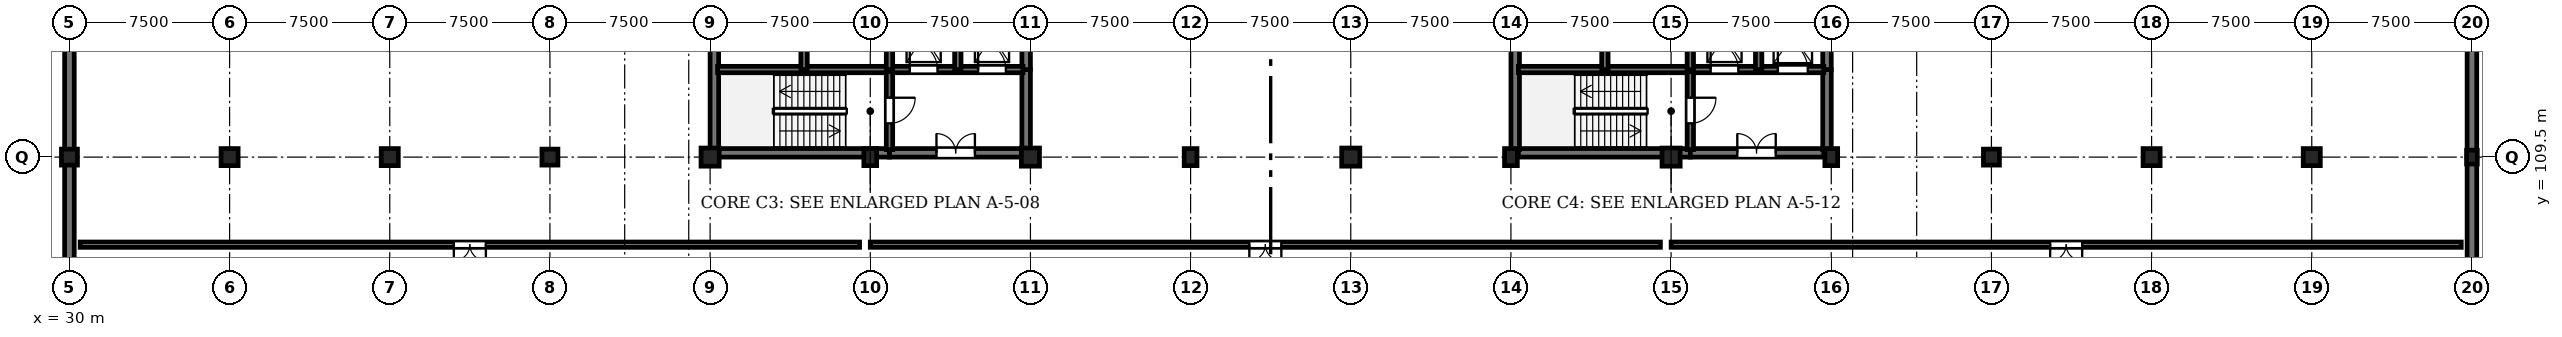
"""IFC4 building model, lengths in metres.
Left out: names, types, materials, properties, quantities, classifications, styles, units other than length and angle.
Written with IfcOpenShell. Run it as: python <this file> out.ifc"""

import sys

from ifc_helpers import new_model, si_unit, direction, frame, frame_2d, origin, origin_2d, place, context, subcontext, project, spatial, rectangle, circle, extrude, element, fill, save


model = new_model("IFC4")
c1 = context("Model", 3, precision=1e-05, world=origin(), true_north=direction((0.0, 1.0)))
c2 = subcontext(c1, "Body", "Model", "MODEL_VIEW")
j1 = project(units=[si_unit("LENGTHUNIT", "METRE"), si_unit("PLANEANGLEUNIT", "RADIAN")], contexts=[c1])
p1 = place(None, origin())
s1 = spatial("IfcSite", under=j1, at=p1, CompositionType="ELEMENT")
p2 = place(p1, origin())
s2 = spatial("IfcBuilding", under=s1, at=p2, CompositionType="ELEMENT")
p3 = place(p2, frame((0.0, 0.0, -4.5)))
s3 = spatial("IfcBuildingStorey", under=s2, at=p3, CompositionType="ELEMENT", Elevation=-4.5)
p4 = place(p3, frame((30.0, 109.5, 0.0), z_axis=(0.0, 0.0, 1.0), x_axis=(1.0, 0.0, 0.0)))
e1 = element("IfcColumn", 1, at=p4, inside=s3, PredefinedType="COLUMN", context=c2, shape_type="SweptSolid", body=[
    extrude(rectangle(XDim=0.75, YDim=0.75, at=origin_2d()), origin(), (0.0, 0.0, 1.0), 4.5),
])
for number, where, z_axis, x_axis in (
    (2, (37.5, 109.5, 0.0), (0.0, 0.0, 1.0), (1.0, 0.0, 0.0)),
    (3, (45.0, 109.5, 0.0), (0.0, 0.0, 1.0), (1.0, 0.0, 0.0)),
):
    element("IfcColumn", number, at=place(p3, frame(where, z_axis=z_axis, x_axis=x_axis)), inside=s3, PredefinedType="COLUMN", context=c2, shape_type="SweptSolid", body=[
        extrude(rectangle(XDim=0.8, YDim=0.8, at=origin_2d()), origin(), (0.0, 0.0, 1.0), 4.5),
    ])
p5 = place(p3, frame((52.5, 109.5, 0.0), z_axis=(0.0, 0.0, 1.0), x_axis=(1.0, 0.0, 0.0)))
e4 = element("IfcColumn", 4, at=p5, inside=s3, PredefinedType="COLUMN", context=c2, shape_type="SweptSolid", body=[
    extrude(circle(Radius=0.375, at=origin_2d()), origin(), (0.0, 0.0, 1.0), 4.5),
])
p6 = place(p3, frame((60.0, 109.5, 0.0), z_axis=(0.0, 0.0, 1.0), x_axis=(1.0, 0.0, 0.0)))
e5 = element("IfcColumn", 5, at=p6, inside=s3, PredefinedType="COLUMN", context=c2, shape_type="SweptSolid", body=[
    extrude(rectangle(XDim=0.85, YDim=0.85, at=origin_2d()), origin(), (0.0, 0.0, 1.0), 4.5),
])
p7 = place(p3, frame((67.5, 109.5, 0.0), z_axis=(0.0, 0.0, 1.0), x_axis=(1.0, 0.0, 0.0)))
e6 = element("IfcColumn", 6, at=p7, inside=s3, PredefinedType="COLUMN", context=c2, shape_type="SweptSolid", body=[
    extrude(rectangle(XDim=0.6, YDim=0.8, at=origin_2d()), origin(), (0.0, 0.0, 1.0), 4.5),
])
p8 = place(p3, frame((75.0, 109.5, 0.0), z_axis=(0.0, 0.0, 1.0), x_axis=(1.0, 0.0, 0.0)))
e7 = element("IfcColumn", 7, at=p8, inside=s3, PredefinedType="COLUMN", context=c2, shape_type="SweptSolid", body=[
    extrude(rectangle(XDim=0.85, YDim=0.85, at=origin_2d()), origin(), (0.0, 0.0, 1.0), 4.5),
])
p9 = place(p3, frame((82.5, 109.5, 0.0), z_axis=(0.0, 0.0, 1.0), x_axis=(1.0, 0.0, 0.0)))
e8 = element("IfcColumn", 8, at=p9, inside=s3, PredefinedType="COLUMN", context=c2, shape_type="SweptSolid", body=[
    extrude(rectangle(XDim=0.6, YDim=0.8, at=origin_2d()), origin(), (0.0, 0.0, 1.0), 4.5),
])
p10 = place(p3, frame((90.0, 109.5, 0.0), z_axis=(0.0, 0.0, 1.0), x_axis=(1.0, 0.0, 0.0)))
e9 = element("IfcColumn", 9, at=p10, inside=s3, PredefinedType="COLUMN", context=c2, shape_type="SweptSolid", body=[
    extrude(rectangle(XDim=0.85, YDim=0.85, at=origin_2d()), origin(), (0.0, 0.0, 1.0), 4.5),
])
p11 = place(p3, frame((97.5, 109.5, 0.0), z_axis=(0.0, 0.0, 1.0), x_axis=(1.0, 0.0, 0.0)))
e10 = element("IfcColumn", 10, at=p11, inside=s3, PredefinedType="COLUMN", context=c2, shape_type="SweptSolid", body=[
    extrude(rectangle(XDim=0.6, YDim=0.8, at=origin_2d()), origin(), (0.0, 0.0, 1.0), 4.5),
])
p12 = place(p3, frame((105.0, 109.5, 0.0), z_axis=(0.0, 0.0, 1.0), x_axis=(1.0, 0.0, 0.0)))
e11 = element("IfcColumn", 11, at=p12, inside=s3, PredefinedType="COLUMN", context=c2, shape_type="SweptSolid", body=[
    extrude(rectangle(XDim=0.85, YDim=0.85, at=origin_2d()), origin(), (0.0, 0.0, 1.0), 4.5),
])
p13 = place(p3, frame((112.5, 109.5, 0.0), z_axis=(0.0, 0.0, 1.0), x_axis=(1.0, 0.0, 0.0)))
e12 = element("IfcColumn", 12, at=p13, inside=s3, PredefinedType="COLUMN", context=c2, shape_type="SweptSolid", body=[
    extrude(rectangle(XDim=0.6, YDim=0.8, at=origin_2d()), origin(), (0.0, 0.0, 1.0), 4.5),
])
p14 = place(p3, frame((120.0, 109.5, 0.0), z_axis=(0.0, 0.0, 1.0), x_axis=(1.0, 0.0, 0.0)))
e13 = element("IfcColumn", 13, at=p14, inside=s3, PredefinedType="COLUMN", context=c2, shape_type="SweptSolid", body=[
    extrude(circle(Radius=0.375, at=origin_2d()), origin(), (0.0, 0.0, 1.0), 4.5),
])
for number, where, z_axis, x_axis in (
    (14, (127.5, 109.5, 0.0), (0.0, 0.0, 1.0), (1.0, 0.0, 0.0)),
    (15, (135.0, 109.5, 0.0), (0.0, 0.0, 1.0), (1.0, 0.0, 0.0)),
):
    element("IfcColumn", number, at=place(p3, frame(where, z_axis=z_axis, x_axis=x_axis)), inside=s3, PredefinedType="COLUMN", context=c2, shape_type="SweptSolid", body=[
        extrude(rectangle(XDim=0.8, YDim=0.8, at=origin_2d()), origin(), (0.0, 0.0, 1.0), 4.5),
    ])
p15 = place(p3, frame((142.5, 109.5, 0.0), z_axis=(0.0, 0.0, 1.0), x_axis=(1.0, 0.0, 0.0)))
e16 = element("IfcColumn", 16, at=p15, inside=s3, PredefinedType="COLUMN", context=c2, shape_type="SweptSolid", body=[
    extrude(rectangle(XDim=0.5, YDim=0.65, at=origin_2d()), origin(), (0.0, 0.0, 1.0), 4.5),
])
p16 = place(p3, frame((30.0, 100.5, 0.0), z_axis=(0.0, 0.0, 1.0), x_axis=(0.0, 1.0, 0.0)))
e17 = element("IfcWall", 17, at=p16, inside=s3, PredefinedType="SOLIDWALL", context=c2, shape_type="SweptSolid", body=[
    extrude(rectangle(XDim=9.0, YDim=0.45, at=frame_2d((4.5, 0.0))), origin(), (0.0, 0.0, 1.0), 4.14),
])
for number, where, z_axis, x_axis in (
    (18, (30.0, 109.5, 0.0), (0.0, 0.0, 1.0), (0.0, 1.0, 0.0)),
    (19, (142.5, 117.0, 0.0), (0.0, 0.0, 1.0), (0.0, -1.0, 0.0)),
):
    element("IfcWall", number, at=place(p3, frame(where, z_axis=z_axis, x_axis=x_axis)), inside=s3, PredefinedType="SOLIDWALL", context=c2, shape_type="SweptSolid", body=[
        extrude(rectangle(XDim=7.5, YDim=0.45, at=frame_2d((3.75, 0.0))), origin(), (0.0, 0.0, 1.0), 4.14),
    ])
p17 = place(p3, frame((142.5, 109.5, 0.0), z_axis=(0.0, 0.0, 1.0), x_axis=(0.0, -1.0, 0.0)))
e20 = element("IfcWall", 20, at=p17, inside=s3, PredefinedType="SOLIDWALL", context=c2, shape_type="SweptSolid", body=[
    extrude(rectangle(XDim=9.0, YDim=0.45, at=frame_2d((4.5, 0.0))), origin(), (0.0, 0.0, 1.0), 4.14),
])
p18 = place(p3, frame((60.35, 109.7, 0.0), z_axis=(0.0, 0.0, 1.0), x_axis=(1.0, 0.0, 0.0)))
e21 = element("IfcWall", 21, at=p18, inside=s3, PredefinedType="SHEAR", context=c2, shape_type="SweptSolid", body=[
    extrude(rectangle(XDim=8.05, YDim=0.4, at=frame_2d((4.025, 0.0))), origin(), (0.0, 0.0, 1.0), 4.14),
])
p19 = place(p3, frame((68.4, 109.7, 0.0), z_axis=(0.0, 0.0, 1.0), x_axis=(1.0, 0.0, 0.0)))
e22 = element("IfcWall", 22, at=p19, inside=s3, PredefinedType="SHEAR", context=c2, shape_type="SweptSolid", body=[
    extrude(rectangle(XDim=6.25, YDim=0.4, at=frame_2d((3.125, 0.0))), origin(), (0.0, 0.0, 1.0), 4.14),
])
p20 = place(p19, frame((2.2, 0.0, 0.0)))
e23 = element("IfcOpeningElement", 23, at=p20, cuts=e22, PredefinedType="OPENING", context=c2, shape_type="SweptSolid", body=[
    extrude(rectangle(XDim=1.8, YDim=2.25, at=frame_2d((0.9, 1.125))), frame((0.0, 0.21, 0.0), z_axis=(0.0, -1.0, 0.0), x_axis=(1.0, 0.0, 0.0)), (0.0, 0.0, 1.0), 0.42),
])
p21 = place(p3, frame((60.2, 109.85, 0.0), z_axis=(0.0, 0.0, 1.0), x_axis=(0.0, 1.0, 0.0)))
e24 = element("IfcWall", 24, at=p21, inside=s3, PredefinedType="SHEAR", context=c2, shape_type="SweptSolid", body=[
    extrude(rectangle(XDim=6.8, YDim=0.4, at=frame_2d((3.4, 0.0))), origin(), (0.0, 0.0, 1.0), 4.14),
])
p22 = place(p3, frame((74.8, 109.85, 0.0), z_axis=(0.0, 0.0, 1.0), x_axis=(0.0, 1.0, 0.0)))
e25 = element("IfcWall", 25, at=p22, inside=s3, PredefinedType="SHEAR", context=c2, shape_type="SweptSolid", body=[
    extrude(rectangle(XDim=3.75, YDim=0.4, at=frame_2d((1.875, 0.0))), origin(), (0.0, 0.0, 1.0), 4.14),
])
p23 = place(p3, frame((74.8, 113.6, 0.0), z_axis=(0.0, 0.0, 1.0), x_axis=(0.0, 1.0, 0.0)))
e26 = element("IfcWall", 26, at=p23, inside=s3, PredefinedType="SHEAR", context=c2, shape_type="SweptSolid", body=[
    extrude(rectangle(XDim=3.05, YDim=0.4, at=frame_2d((1.525, 0.0))), origin(), (0.0, 0.0, 1.0), 4.14),
])
p24 = place(p3, frame((60.35, 113.6, 0.0), z_axis=(0.0, 0.0, 1.0), x_axis=(1.0, 0.0, 0.0)))
e27 = element("IfcWall", 27, at=p24, inside=s3, PredefinedType="SHEAR", context=c2, shape_type="SweptSolid", body=[
    extrude(rectangle(XDim=8.05, YDim=0.3, at=frame_2d((4.025, 0.0))), origin(), (0.0, 0.0, 1.0), 4.14),
])
p25 = place(p3, frame((68.4, 113.6, 0.0), z_axis=(0.0, 0.0, 1.0), x_axis=(1.0, 0.0, 0.0)))
e28 = element("IfcWall", 28, at=p25, inside=s3, PredefinedType="SHEAR", context=c2, shape_type="SweptSolid", body=[
    extrude(rectangle(XDim=6.25, YDim=0.3, at=frame_2d((3.125, 0.0))), origin(), (0.0, 0.0, 1.0), 4.14),
])
p26 = place(p25, frame((0.95, 0.0, 0.0)))
e29 = element("IfcOpeningElement", 29, at=p26, cuts=e28, PredefinedType="OPENING", context=c2, shape_type="SweptSolid", body=[
    extrude(rectangle(XDim=1.3, YDim=2.2, at=frame_2d((0.65, 1.1))), frame((0.0, 0.16, 0.0), z_axis=(0.0, -1.0, 0.0), x_axis=(1.0, 0.0, 0.0)), (0.0, 0.0, 1.0), 0.32),
])
p27 = place(p25, frame((4.15, 0.0, 0.0)))
e30 = element("IfcOpeningElement", 30, at=p27, cuts=e28, PredefinedType="OPENING", context=c2, shape_type="SweptSolid", body=[
    extrude(rectangle(XDim=1.3, YDim=2.2, at=frame_2d((0.65, 1.1))), frame((0.0, 0.16, 0.0), z_axis=(0.0, -1.0, 0.0), x_axis=(1.0, 0.0, 0.0)), (0.0, 0.0, 1.0), 0.32),
])
p28 = place(p3, frame((68.4, 113.5, 0.0), z_axis=(0.0, 0.0, 1.0), x_axis=(0.0, -1.0, 0.0)))
e31 = element("IfcWall", 31, at=p28, inside=s3, PredefinedType="SHEAR", context=c2, shape_type="SweptSolid", body=[
    extrude(rectangle(XDim=3.65, YDim=0.3, at=frame_2d((1.825, 0.0))), origin(), (0.0, 0.0, 1.0), 4.14),
])
p29 = place(p28, frame((1.22, 0.0, 0.0)))
e32 = element("IfcOpeningElement", 32, at=p29, cuts=e31, PredefinedType="OPENING", context=c2, shape_type="SweptSolid", body=[
    extrude(rectangle(XDim=1.2, YDim=2.25, at=frame_2d((0.6, 1.125))), frame((0.0, 0.16, 0.0), z_axis=(0.0, -1.0, 0.0), x_axis=(1.0, 0.0, 0.0)), (0.0, 0.0, 1.0), 0.32),
])
for number, where, z_axis, x_axis in (
    (33, (64.4, 113.6, 0.0), (0.0, 0.0, 1.0), (0.0, 1.0, 0.0)),
    (34, (68.4, 113.6, 0.0), (0.0, 0.0, 1.0), (0.0, 1.0, 0.0)),
    (35, (71.6, 113.6, 0.0), (0.0, 0.0, 1.0), (0.0, 1.0, 0.0)),
):
    element("IfcWall", number, at=place(p3, frame(where, z_axis=z_axis, x_axis=x_axis)), inside=s3, PredefinedType="SHEAR", context=c2, shape_type="SweptSolid", body=[
        extrude(rectangle(XDim=3.15, YDim=0.3, at=frame_2d((1.575, 0.0))), origin(), (0.0, 0.0, 1.0), 4.14),
    ])
p30 = place(p3, frame((97.85, 109.7, 0.0), z_axis=(0.0, 0.0, 1.0), x_axis=(1.0, 0.0, 0.0)))
e36 = element("IfcWall", 36, at=p30, inside=s3, PredefinedType="SHEAR", context=c2, shape_type="SweptSolid", body=[
    extrude(rectangle(XDim=8.05, YDim=0.4, at=frame_2d((4.025, 0.0))), origin(), (0.0, 0.0, 1.0), 4.14),
])
p31 = place(p3, frame((105.9, 109.7, 0.0), z_axis=(0.0, 0.0, 1.0), x_axis=(1.0, 0.0, 0.0)))
e37 = element("IfcWall", 37, at=p31, inside=s3, PredefinedType="SHEAR", context=c2, shape_type="SweptSolid", body=[
    extrude(rectangle(XDim=6.25, YDim=0.4, at=frame_2d((3.125, 0.0))), origin(), (0.0, 0.0, 1.0), 4.14),
])
p32 = place(p31, frame((2.2, 0.0, 0.0)))
e38 = element("IfcOpeningElement", 38, at=p32, cuts=e37, PredefinedType="OPENING", context=c2, shape_type="SweptSolid", body=[
    extrude(rectangle(XDim=1.8, YDim=2.25, at=frame_2d((0.9, 1.125))), frame((0.0, 0.21, 0.0), z_axis=(0.0, -1.0, 0.0), x_axis=(1.0, 0.0, 0.0)), (0.0, 0.0, 1.0), 0.42),
])
p33 = place(p3, frame((97.7, 109.85, 0.0), z_axis=(0.0, 0.0, 1.0), x_axis=(0.0, 1.0, 0.0)))
e39 = element("IfcWall", 39, at=p33, inside=s3, PredefinedType="SHEAR", context=c2, shape_type="SweptSolid", body=[
    extrude(rectangle(XDim=6.8, YDim=0.4, at=frame_2d((3.4, 0.0))), origin(), (0.0, 0.0, 1.0), 4.14),
])
p34 = place(p3, frame((112.3, 109.85, 0.0), z_axis=(0.0, 0.0, 1.0), x_axis=(0.0, 1.0, 0.0)))
e40 = element("IfcWall", 40, at=p34, inside=s3, PredefinedType="SHEAR", context=c2, shape_type="SweptSolid", body=[
    extrude(rectangle(XDim=3.75, YDim=0.4, at=frame_2d((1.875, 0.0))), origin(), (0.0, 0.0, 1.0), 4.14),
])
p35 = place(p3, frame((112.3, 113.6, 0.0), z_axis=(0.0, 0.0, 1.0), x_axis=(0.0, 1.0, 0.0)))
e41 = element("IfcWall", 41, at=p35, inside=s3, PredefinedType="SHEAR", context=c2, shape_type="SweptSolid", body=[
    extrude(rectangle(XDim=3.05, YDim=0.4, at=frame_2d((1.525, 0.0))), origin(), (0.0, 0.0, 1.0), 4.14),
])
p36 = place(p3, frame((97.85, 113.6, 0.0), z_axis=(0.0, 0.0, 1.0), x_axis=(1.0, 0.0, 0.0)))
e42 = element("IfcWall", 42, at=p36, inside=s3, PredefinedType="SHEAR", context=c2, shape_type="SweptSolid", body=[
    extrude(rectangle(XDim=8.05, YDim=0.3, at=frame_2d((4.025, 0.0))), origin(), (0.0, 0.0, 1.0), 4.14),
])
p37 = place(p3, frame((105.9, 113.6, 0.0), z_axis=(0.0, 0.0, 1.0), x_axis=(1.0, 0.0, 0.0)))
e43 = element("IfcWall", 43, at=p37, inside=s3, PredefinedType="SHEAR", context=c2, shape_type="SweptSolid", body=[
    extrude(rectangle(XDim=6.25, YDim=0.3, at=frame_2d((3.125, 0.0))), origin(), (0.0, 0.0, 1.0), 4.14),
])
p38 = place(p37, frame((0.95, 0.0, 0.0)))
e44 = element("IfcOpeningElement", 44, at=p38, cuts=e43, PredefinedType="OPENING", context=c2, shape_type="SweptSolid", body=[
    extrude(rectangle(XDim=1.3, YDim=2.2, at=frame_2d((0.65, 1.1))), frame((0.0, 0.16, 0.0), z_axis=(0.0, -1.0, 0.0), x_axis=(1.0, 0.0, 0.0)), (0.0, 0.0, 1.0), 0.32),
])
p39 = place(p37, frame((4.1, 0.0, 0.0)))
e45 = element("IfcOpeningElement", 45, at=p39, cuts=e43, PredefinedType="OPENING", context=c2, shape_type="SweptSolid", body=[
    extrude(rectangle(XDim=1.4, YDim=2.25, at=frame_2d((0.7, 1.125))), frame((0.0, 0.16, 0.0), z_axis=(0.0, -1.0, 0.0), x_axis=(1.0, 0.0, 0.0)), (0.0, 0.0, 1.0), 0.32),
])
p40 = place(p3, frame((105.9, 113.5, 0.0), z_axis=(0.0, 0.0, 1.0), x_axis=(0.0, -1.0, 0.0)))
e46 = element("IfcWall", 46, at=p40, inside=s3, PredefinedType="SHEAR", context=c2, shape_type="SweptSolid", body=[
    extrude(rectangle(XDim=3.65, YDim=0.3, at=frame_2d((1.825, 0.0))), origin(), (0.0, 0.0, 1.0), 4.14),
])
p41 = place(p40, frame((1.22, 0.0, 0.0)))
e47 = element("IfcOpeningElement", 47, at=p41, cuts=e46, PredefinedType="OPENING", context=c2, shape_type="SweptSolid", body=[
    extrude(rectangle(XDim=1.2, YDim=2.25, at=frame_2d((0.6, 1.125))), frame((0.0, 0.16, 0.0), z_axis=(0.0, -1.0, 0.0), x_axis=(1.0, 0.0, 0.0)), (0.0, 0.0, 1.0), 0.32),
])
for number, where, z_axis, x_axis in (
    (48, (101.9, 113.6, 0.0), (0.0, 0.0, 1.0), (0.0, 1.0, 0.0)),
    (49, (105.9, 113.6, 0.0), (0.0, 0.0, 1.0), (0.0, 1.0, 0.0)),
    (50, (109.1, 113.6, 0.0), (0.0, 0.0, 1.0), (0.0, 1.0, 0.0)),
):
    element("IfcWall", number, at=place(p3, frame(where, z_axis=z_axis, x_axis=x_axis)), inside=s3, PredefinedType="SHEAR", context=c2, shape_type="SweptSolid", body=[
        extrude(rectangle(XDim=3.15, YDim=0.3, at=frame_2d((1.575, 0.0))), origin(), (0.0, 0.0, 1.0), 4.14),
    ])
p42 = place(p3, frame((67.0, 105.4, 0.0), z_axis=(0.0, 0.0, 1.0), x_axis=(-1.0, 0.0, 0.0)))
e51 = element("IfcWall", 51, at=p42, inside=s3, PredefinedType="STANDARD", context=c2, shape_type="SweptSolid", body=[
    extrude(rectangle(XDim=36.5, YDim=0.25, at=frame_2d((18.25, 0.0))), origin(), (0.0, 0.0, 1.0), 4.125),
])
p43 = place(p42, frame((17.5, 0.0, 0.0)))
e52 = element("IfcOpeningElement", 52, at=p43, cuts=e51, PredefinedType="OPENING", context=c2, shape_type="SweptSolid", body=[
    extrude(rectangle(XDim=1.5, YDim=2.3, at=frame_2d((0.75, 1.15))), frame((0.0, 0.135, 0.0), z_axis=(0.0, -1.0, 0.0), x_axis=(1.0, 0.0, 0.0)), (0.0, 0.0, 1.0), 0.27),
])
p44 = place(p3, frame((104.5, 105.4, 0.0), z_axis=(0.0, 0.0, 1.0), x_axis=(-1.0, 0.0, 0.0)))
e53 = element("IfcWall", 53, at=p44, inside=s3, PredefinedType="STANDARD", context=c2, shape_type="SweptSolid", body=[
    extrude(rectangle(XDim=37.0, YDim=0.25, at=frame_2d((18.5, 0.0))), origin(), (0.0, 0.0, 1.0), 4.125),
])
p45 = place(p44, frame((17.75, 0.0, 0.0)))
e54 = element("IfcOpeningElement", 54, at=p45, cuts=e53, PredefinedType="OPENING", context=c2, shape_type="SweptSolid", body=[
    extrude(rectangle(XDim=1.5, YDim=2.3, at=frame_2d((0.75, 1.15))), frame((0.0, 0.135, 0.0), z_axis=(0.0, -1.0, 0.0), x_axis=(1.0, 0.0, 0.0)), (0.0, 0.0, 1.0), 0.27),
])
p46 = place(p3, frame((142.0, 105.4, 0.0), z_axis=(0.0, 0.0, 1.0), x_axis=(-1.0, 0.0, 0.0)))
e55 = element("IfcWall", 55, at=p46, inside=s3, PredefinedType="STANDARD", context=c2, shape_type="SweptSolid", body=[
    extrude(rectangle(XDim=37.0, YDim=0.25, at=frame_2d((18.5, 0.0))), origin(), (0.0, 0.0, 1.0), 4.125),
])
p47 = place(p46, frame((17.75, 0.0, 0.0)))
e56 = element("IfcOpeningElement", 56, at=p47, cuts=e55, PredefinedType="OPENING", context=c2, shape_type="SweptSolid", body=[
    extrude(rectangle(XDim=1.5, YDim=2.3, at=frame_2d((0.75, 1.15))), frame((0.0, 0.135, 0.0), z_axis=(0.0, -1.0, 0.0), x_axis=(1.0, 0.0, 0.0)), (0.0, 0.0, 1.0), 0.27),
])
p48 = place(p20, origin())
e57 = element("IfcDoor", 57, at=p48, inside=s3, OperationType="DOUBLE_DOOR_SINGLE_SWING", PredefinedType="DOOR", context=c2, shape_type="SweptSolid", body=[
    extrude(rectangle(XDim=1.8, YDim=2.25, at=frame_2d((0.9, 1.125))), frame((0.0, 0.025, 0.0), z_axis=(0.0, -1.0, 0.0), x_axis=(1.0, 0.0, 0.0)), (0.0, 0.0, 1.0), 0.05),
])
fill(e23, e57)
p49 = place(p26, origin())
e58 = element("IfcDoor", 58, at=p49, inside=s3, OperationType="DOUBLE_DOOR_SLIDING", PredefinedType="DOOR", context=c2, shape_type="SweptSolid", body=[
    extrude(rectangle(XDim=1.3, YDim=2.2, at=frame_2d((0.65, 1.1))), frame((0.0, 0.025, 0.0), z_axis=(0.0, -1.0, 0.0), x_axis=(1.0, 0.0, 0.0)), (0.0, 0.0, 1.0), 0.05),
])
fill(e29, e58)
p50 = place(p27, origin())
e59 = element("IfcDoor", 59, at=p50, inside=s3, OperationType="DOUBLE_DOOR_SLIDING", PredefinedType="DOOR", context=c2, shape_type="SweptSolid", body=[
    extrude(rectangle(XDim=1.3, YDim=2.2, at=frame_2d((0.65, 1.1))), frame((0.0, 0.025, 0.0), z_axis=(0.0, -1.0, 0.0), x_axis=(1.0, 0.0, 0.0)), (0.0, 0.0, 1.0), 0.05),
])
fill(e30, e59)
p51 = place(p29, origin())
e60 = element("IfcDoor", 60, at=p51, inside=s3, OperationType="SINGLE_SWING_LEFT", PredefinedType="DOOR", context=c2, shape_type="SweptSolid", body=[
    extrude(rectangle(XDim=1.2, YDim=2.25, at=frame_2d((0.6, 1.125))), frame((0.0, 0.025, 0.0), z_axis=(0.0, -1.0, 0.0), x_axis=(1.0, 0.0, 0.0)), (0.0, 0.0, 1.0), 0.05),
])
fill(e32, e60)
p52 = place(p32, origin())
e61 = element("IfcDoor", 61, at=p52, inside=s3, OperationType="DOUBLE_DOOR_SINGLE_SWING", PredefinedType="DOOR", context=c2, shape_type="SweptSolid", body=[
    extrude(rectangle(XDim=1.8, YDim=2.25, at=frame_2d((0.9, 1.125))), frame((0.0, 0.025, 0.0), z_axis=(0.0, -1.0, 0.0), x_axis=(1.0, 0.0, 0.0)), (0.0, 0.0, 1.0), 0.05),
])
fill(e38, e61)
p53 = place(p38, origin())
e62 = element("IfcDoor", 62, at=p53, inside=s3, OperationType="DOUBLE_DOOR_SLIDING", PredefinedType="DOOR", context=c2, shape_type="SweptSolid", body=[
    extrude(rectangle(XDim=1.3, YDim=2.2, at=frame_2d((0.65, 1.1))), frame((0.0, 0.025, 0.0), z_axis=(0.0, -1.0, 0.0), x_axis=(1.0, 0.0, 0.0)), (0.0, 0.0, 1.0), 0.05),
])
fill(e44, e62)
p54 = place(p39, origin())
e63 = element("IfcDoor", 63, at=p54, inside=s3, OperationType="DOUBLE_DOOR_SLIDING", PredefinedType="DOOR", context=c2, shape_type="SweptSolid", body=[
    extrude(rectangle(XDim=1.4, YDim=2.25, at=frame_2d((0.7, 1.125))), frame((0.0, 0.025, 0.0), z_axis=(0.0, -1.0, 0.0), x_axis=(1.0, 0.0, 0.0)), (0.0, 0.0, 1.0), 0.05),
])
fill(e45, e63)
p55 = place(p41, origin())
e64 = element("IfcDoor", 64, at=p55, inside=s3, OperationType="SINGLE_SWING_LEFT", PredefinedType="DOOR", context=c2, shape_type="SweptSolid", body=[
    extrude(rectangle(XDim=1.2, YDim=2.25, at=frame_2d((0.6, 1.125))), frame((0.0, 0.025, 0.0), z_axis=(0.0, -1.0, 0.0), x_axis=(1.0, 0.0, 0.0)), (0.0, 0.0, 1.0), 0.05),
])
fill(e47, e64)
p56 = place(p43, origin())
e65 = element("IfcDoor", 65, at=p56, inside=s3, OperationType="DOUBLE_DOOR_SINGLE_SWING", PredefinedType="DOOR", context=c2, shape_type="SweptSolid", body=[
    extrude(rectangle(XDim=1.5, YDim=2.3, at=frame_2d((0.75, 1.15))), frame((0.0, 0.025, 0.0), z_axis=(0.0, -1.0, 0.0), x_axis=(1.0, 0.0, 0.0)), (0.0, 0.0, 1.0), 0.05),
])
fill(e52, e65)
p57 = place(p45, origin())
e66 = element("IfcDoor", 66, at=p57, inside=s3, OperationType="DOUBLE_DOOR_SINGLE_SWING", PredefinedType="DOOR", context=c2, shape_type="SweptSolid", body=[
    extrude(rectangle(XDim=1.5, YDim=2.3, at=frame_2d((0.75, 1.15))), frame((0.0, 0.025, 0.0), z_axis=(0.0, -1.0, 0.0), x_axis=(1.0, 0.0, 0.0)), (0.0, 0.0, 1.0), 0.05),
])
fill(e54, e66)
p58 = place(p47, origin())
e67 = element("IfcDoor", 67, at=p58, inside=s3, OperationType="DOUBLE_DOOR_SINGLE_SWING", PredefinedType="DOOR", context=c2, shape_type="SweptSolid", body=[
    extrude(rectangle(XDim=1.5, YDim=2.3, at=frame_2d((0.75, 1.15))), frame((0.0, 0.025, 0.0), z_axis=(0.0, -1.0, 0.0), x_axis=(1.0, 0.0, 0.0)), (0.0, 0.0, 1.0), 0.05),
])
fill(e56, e67)
save(model, sys.argv[1])
